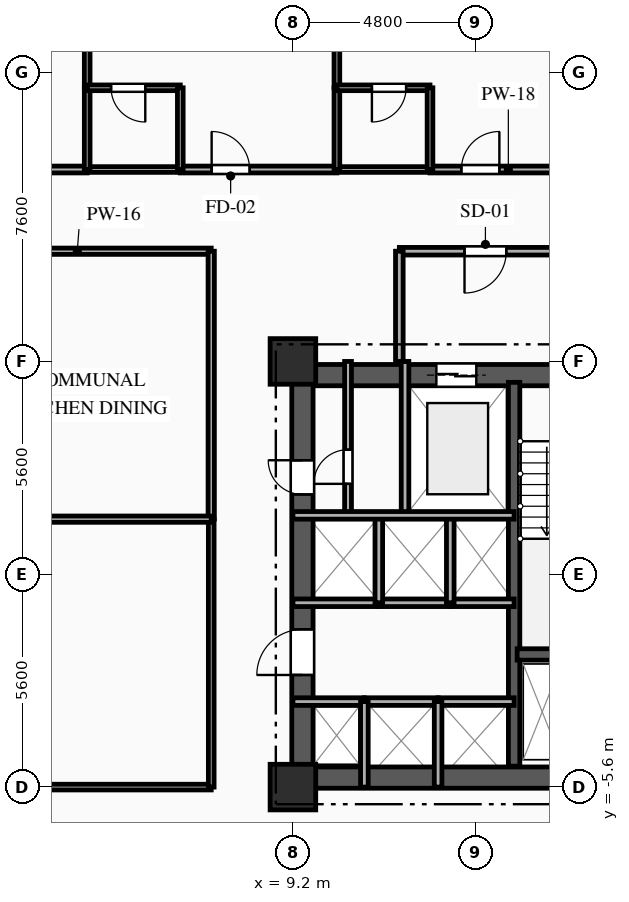
"""IFC4 building model, lengths in metres.
Left out: names, types, materials, properties, quantities, classifications, styles, units other than length and angle.
Written with IfcOpenShell. Run it as: python <this file> out.ifc"""

import sys

from ifc_helpers import new_model, si_unit, direction, frame, frame_2d, origin, origin_2d, place, context, subcontext, project, spatial, rectangle, extrude, element, fill, save


model = new_model("IFC4")
c1 = context("Model", 3, precision=1e-05, world=origin(), true_north=direction((0.0, 1.0)))
c2 = subcontext(c1, "Body", "Model", "MODEL_VIEW")
j1 = project(units=[si_unit("LENGTHUNIT", "METRE"), si_unit("PLANEANGLEUNIT", "RADIAN")], contexts=[c1])
p1 = place(None, origin())
s1 = spatial("IfcSite", under=j1, at=p1, CompositionType="ELEMENT")
p2 = place(p1, origin())
s2 = spatial("IfcBuilding", under=s1, at=p2, CompositionType="ELEMENT")
p3 = place(p2, frame((0.0, 0.0, 33.7)))
s3 = spatial("IfcBuildingStorey", under=s2, at=p3, CompositionType="ELEMENT", Elevation=33.7)
for number, where, z_axis, x_axis in (
    (1, (9.2, -5.6, 0.0), (0.0, 0.0, 1.0), (1.0, 0.0, 0.0)),
    (2, (9.2, 5.6, 0.0), (0.0, 0.0, 1.0), (1.0, 0.0, 0.0)),
):
    element("IfcColumn", number, at=place(p3, frame(where, z_axis=z_axis, x_axis=x_axis)), inside=s3, PredefinedType="COLUMN", context=c2, shape_type="SweptSolid", body=[
        extrude(rectangle(XDim=1.2, YDim=1.2, at=origin_2d()), origin(), (0.0, 0.0, 1.0), 3.35),
    ])
p4 = place(p3, frame((9.2, 5.24, 0.0), z_axis=(0.0, 0.0, 1.0), x_axis=(1.0, 0.0, 0.0)))
e3 = element("IfcWall", 3, at=p4, inside=s3, PredefinedType="SHEAR", context=c2, shape_type="SweptSolid", body=[
    extrude(rectangle(XDim=9.6, YDim=0.56, at=frame_2d((4.8, 0.0))), origin(), (0.0, 0.0, 1.0), 3.035),
])
p5 = place(p4, frame((6.95, 0.0, 0.0)))
e4 = element("IfcOpeningElement", 4, at=p5, cuts=e3, PredefinedType="OPENING", context=c2, shape_type="SweptSolid", body=[
    extrude(rectangle(XDim=1.1, YDim=2.15, at=frame_2d((0.55, 1.075))), frame((0.0, 0.29, 0.0), z_axis=(0.0, -1.0, 0.0), x_axis=(1.0, 0.0, 0.0)), (0.0, 0.0, 1.0), 0.58),
])
p6 = place(p4, frame((3.775, 0.0, 0.0)))
e5 = element("IfcOpeningElement", 5, at=p6, cuts=e3, PredefinedType="OPENING", context=c2, shape_type="SweptSolid", body=[
    extrude(rectangle(XDim=1.05, YDim=2.1, at=frame_2d((0.525, 1.05))), frame((0.0, 0.29, 0.0), z_axis=(0.0, -1.0, 0.0), x_axis=(1.0, 0.0, 0.0)), (0.0, 0.0, 1.0), 0.58),
])
p7 = place(p3, frame((9.2, -5.35, 0.0), z_axis=(0.0, 0.0, 1.0), x_axis=(1.0, 0.0, 0.0)))
e6 = element("IfcWall", 6, at=p7, inside=s3, PredefinedType="SHEAR", context=c2, shape_type="SweptSolid", body=[
    extrude(rectangle(XDim=9.6, YDim=0.56, at=frame_2d((4.8, 0.0))), origin(), (0.0, 0.0, 1.0), 3.035),
])
p8 = place(p7, frame((7.65, 0.0, 0.0)))
e7 = element("IfcOpeningElement", 7, at=p8, cuts=e6, PredefinedType="OPENING", context=c2, shape_type="SweptSolid", body=[
    extrude(rectangle(XDim=0.9, YDim=2.1, at=frame_2d((0.45, 1.05))), frame((0.0, 0.29, 0.0), z_axis=(0.0, -1.0, 0.0), x_axis=(1.0, 0.0, 0.0)), (0.0, 0.0, 1.0), 0.58),
])
p9 = place(p3, frame((9.45, -5.05, 0.0), z_axis=(0.0, 0.0, 1.0), x_axis=(0.0, 1.0, 0.0)))
e8 = element("IfcWall", 8, at=p9, inside=s3, PredefinedType="SHEAR", context=c2, shape_type="SweptSolid", body=[
    extrude(rectangle(XDim=10.1, YDim=0.56, at=frame_2d((5.05, 0.0))), origin(), (0.0, 0.0, 1.0), 3.035),
])
p10 = place(p9, frame((7.15, 0.0, 0.0)))
e9 = element("IfcOpeningElement", 9, at=p10, cuts=e8, PredefinedType="OPENING", context=c2, shape_type="SweptSolid", body=[
    extrude(rectangle(XDim=0.9, YDim=2.1, at=frame_2d((0.45, 1.05))), frame((0.0, 0.29, 0.0), z_axis=(0.0, -1.0, 0.0), x_axis=(1.0, 0.0, 0.0)), (0.0, 0.0, 1.0), 0.58),
])
p11 = place(p9, frame((2.4, 0.0, 0.0)))
e10 = element("IfcOpeningElement", 10, at=p11, cuts=e8, PredefinedType="OPENING", context=c2, shape_type="SweptSolid", body=[
    extrude(rectangle(XDim=1.2, YDim=2.15, at=frame_2d((0.6, 1.075))), frame((0.0, 0.29, 0.0), z_axis=(0.0, -1.0, 0.0), x_axis=(1.0, 0.0, 0.0)), (0.0, 0.0, 1.0), 0.58),
])
p12 = place(p3, frame((15.02, -5.05, 0.0), z_axis=(0.0, 0.0, 1.0), x_axis=(0.0, 1.0, 0.0)))
e11 = element("IfcWall", 11, at=p12, inside=s3, PredefinedType="SHEAR", context=c2, shape_type="SweptSolid", body=[
    extrude(rectangle(XDim=10.1, YDim=0.3, at=frame_2d((5.05, 0.0))), origin(), (0.0, 0.0, 1.0), 3.035),
])
p13 = place(p3, frame((15.1, -2.11, 0.0), z_axis=(0.0, 0.0, 1.0), x_axis=(1.0, 0.0, 0.0)))
e12 = element("IfcWall", 12, at=p13, inside=s3, PredefinedType="SHEAR", context=c2, shape_type="SweptSolid", body=[
    extrude(rectangle(XDim=3.18, YDim=0.3, at=frame_2d((1.59, 0.0))), origin(), (0.0, 0.0, 1.0), 3.035),
])
p14 = place(p3, frame((12.15, 5.6, 0.0), z_axis=(0.0, 0.0, 1.0), x_axis=(0.0, -1.0, 0.0)))
e13 = element("IfcWall", 13, at=p14, inside=s3, PredefinedType="PARTITIONING", context=c2, shape_type="SweptSolid", body=[
    extrude(rectangle(XDim=4.05, YDim=0.2, at=frame_2d((2.025, 0.0))), origin(), (0.0, 0.0, 1.0), 3.035),
])
p15 = place(p3, frame((18.8, 8.5, 0.0), z_axis=(0.0, 0.0, 1.0), x_axis=(-1.0, 0.0, 0.0)))
e14 = element("IfcWall", 14, at=p15, inside=s3, PredefinedType="PARTITIONING", context=c2, shape_type="SweptSolid", body=[
    extrude(rectangle(XDim=6.8, YDim=0.2, at=frame_2d((3.4, 0.0))), origin(), (0.0, 0.0, 1.0), 3.035),
])
p16 = place(p15, frame((3.985, 0.0, 0.0)))
e15 = element("IfcOpeningElement", 15, at=p16, cuts=e14, PredefinedType="OPENING", context=c2, shape_type="SweptSolid", body=[
    extrude(rectangle(XDim=1.1, YDim=2.15, at=frame_2d((0.55, 1.075))), frame((0.0, 0.11, 0.0), z_axis=(0.0, -1.0, 0.0), x_axis=(1.0, 0.0, 0.0)), (0.0, 0.0, 1.0), 0.22),
])
p17 = place(p3, frame((12.0, 8.5, 0.0), z_axis=(0.0, 0.0, 1.0), x_axis=(0.0, -1.0, 0.0)))
e16 = element("IfcWall", 16, at=p17, inside=s3, PredefinedType="PARTITIONING", context=c2, shape_type="SweptSolid", body=[
    extrude(rectangle(XDim=2.9, YDim=0.2, at=frame_2d((1.45, 0.0))), origin(), (0.0, 0.0, 1.0), 3.035),
])
p18 = place(p3, frame((10.65, 1.55, 0.0), z_axis=(0.0, 0.0, 1.0), x_axis=(0.0, 1.0, 0.0)))
e17 = element("IfcWall", 17, at=p18, inside=s3, PredefinedType="PARTITIONING", context=c2, shape_type="SweptSolid", body=[
    extrude(rectangle(XDim=4.05, YDim=0.18, at=frame_2d((2.025, 0.0))), origin(), (0.0, 0.0, 1.0), 3.035),
])
p19 = place(p18, frame((0.829, 0.0, 0.0)))
e18 = element("IfcOpeningElement", 18, at=p19, cuts=e17, PredefinedType="OPENING", context=c2, shape_type="SweptSolid", body=[
    extrude(rectangle(XDim=0.9, YDim=2.1, at=frame_2d((0.45, 1.05))), frame((0.0, 0.1, 0.0), z_axis=(0.0, -1.0, 0.0), x_axis=(1.0, 0.0, 0.0)), (0.0, 0.0, 1.0), 0.2),
])
p20 = place(p3, frame((9.2, -3.35, 0.0), z_axis=(0.0, 0.0, 1.0), x_axis=(1.0, 0.0, 0.0)))
e19 = element("IfcWall", 19, at=p20, inside=s3, PredefinedType="PARTITIONING", context=c2, shape_type="SweptSolid", body=[
    extrude(rectangle(XDim=1.88, YDim=0.2, at=frame_2d((0.94, 0.0))), origin(), (0.0, 0.0, 1.0), 2.75),
])
p21 = place(p3, frame((11.08, -3.35, 0.0), z_axis=(0.0, 0.0, 1.0), x_axis=(1.0, 0.0, 0.0)))
e20 = element("IfcWall", 20, at=p21, inside=s3, PredefinedType="PARTITIONING", context=c2, shape_type="SweptSolid", body=[
    extrude(rectangle(XDim=1.94, YDim=0.2, at=frame_2d((0.97, 0.0))), origin(), (0.0, 0.0, 1.0), 3.035),
])
p22 = place(p3, frame((13.02, -3.35, 0.0), z_axis=(0.0, 0.0, 1.0), x_axis=(1.0, 0.0, 0.0)))
e21 = element("IfcWall", 21, at=p22, inside=s3, PredefinedType="PARTITIONING", context=c2, shape_type="SweptSolid", body=[
    extrude(rectangle(XDim=2.0, YDim=0.2, at=frame_2d((1.0, 0.0))), origin(), (0.0, 0.0, 1.0), 3.035),
])
p23 = place(p3, frame((11.46, -0.75, 0.0), z_axis=(0.0, 0.0, 1.0), x_axis=(-1.0, 0.0, 0.0)))
e22 = element("IfcWall", 22, at=p23, inside=s3, PredefinedType="PARTITIONING", context=c2, shape_type="SweptSolid", body=[
    extrude(rectangle(XDim=2.26, YDim=0.2, at=frame_2d((1.13, 0.0))), origin(), (0.0, 0.0, 1.0), 3.035),
])
p24 = place(p3, frame((13.34, -0.75, 0.0), z_axis=(0.0, 0.0, 1.0), x_axis=(-1.0, 0.0, 0.0)))
e23 = element("IfcWall", 23, at=p24, inside=s3, PredefinedType="PARTITIONING", context=c2, shape_type="SweptSolid", body=[
    extrude(rectangle(XDim=1.88, YDim=0.2, at=frame_2d((0.94, 0.0))), origin(), (0.0, 0.0, 1.0), 3.035),
])
p25 = place(p3, frame((15.02, -0.75, 0.0), z_axis=(0.0, 0.0, 1.0), x_axis=(-1.0, 0.0, 0.0)))
e24 = element("IfcWall", 24, at=p25, inside=s3, PredefinedType="PARTITIONING", context=c2, shape_type="SweptSolid", body=[
    extrude(rectangle(XDim=1.68, YDim=0.2, at=frame_2d((0.84, 0.0))), origin(), (0.0, 0.0, 1.0), 3.035),
])
for number, where, z_axis, x_axis in (
    (25, (11.08, -5.6, 0.0), (0.0, 0.0, 1.0), (0.0, 1.0, 0.0)),
    (26, (13.02, -5.6, 0.0), (0.0, 0.0, 1.0), (0.0, 1.0, 0.0)),
):
    element("IfcWall", number, at=place(p3, frame(where, z_axis=z_axis, x_axis=x_axis)), inside=s3, PredefinedType="PARTITIONING", context=c2, shape_type="SweptSolid", body=[
        extrude(rectangle(XDim=2.25, YDim=0.2, at=frame_2d((1.125, 0.0))), origin(), (0.0, 0.0, 1.0), 3.035),
    ])
for number, where, z_axis, x_axis in (
    (27, (11.46, -0.75, 0.0), (0.0, 0.0, 1.0), (0.0, 1.0, 0.0)),
    (28, (13.34, -0.75, 0.0), (0.0, 0.0, 1.0), (0.0, 1.0, 0.0)),
):
    element("IfcWall", number, at=place(p3, frame(where, z_axis=z_axis, x_axis=x_axis)), inside=s3, PredefinedType="PARTITIONING", context=c2, shape_type="SweptSolid", body=[
        extrude(rectangle(XDim=2.3, YDim=0.2, at=frame_2d((1.15, 0.0))), origin(), (0.0, 0.0, 1.0), 3.035),
    ])
p26 = place(p3, frame((0.0, 10.65, 0.0), z_axis=(0.0, 0.0, 1.0), x_axis=(1.0, 0.0, 0.0)))
e29 = element("IfcWall", 29, at=p26, inside=s3, PredefinedType="PARTITIONING", context=c2, shape_type="SweptSolid", body=[
    extrude(rectangle(XDim=3.786, YDim=0.18, at=frame_2d((1.893, 0.0))), origin(), (0.0, 0.0, 1.0), 3.035),
])
p27 = place(p26, frame((1.393, 0.0, 0.0)))
e30 = element("IfcOpeningElement", 30, at=p27, cuts=e29, PredefinedType="OPENING", context=c2, shape_type="SweptSolid", body=[
    extrude(rectangle(XDim=1.0, YDim=2.15, at=frame_2d((0.5, 1.075))), frame((0.0, 0.1, 0.0), z_axis=(0.0, -1.0, 0.0), x_axis=(1.0, 0.0, 0.0)), (0.0, 0.0, 1.0), 0.2),
])
p28 = place(p3, frame((6.236, 10.65, 0.0), z_axis=(0.0, 0.0, 1.0), x_axis=(1.0, 0.0, 0.0)))
e31 = element("IfcWall", 31, at=p28, inside=s3, PredefinedType="PARTITIONING", context=c2, shape_type="SweptSolid", body=[
    extrude(rectangle(XDim=4.121, YDim=0.18, at=frame_2d((2.061, 0.0))), origin(), (0.0, 0.0, 1.0), 3.035),
])
p29 = place(p28, frame((0.825, 0.0, 0.0)))
e32 = element("IfcOpeningElement", 32, at=p29, cuts=e31, PredefinedType="OPENING", context=c2, shape_type="SweptSolid", body=[
    extrude(rectangle(XDim=1.0, YDim=2.15, at=frame_2d((0.5, 1.075))), frame((0.0, 0.1, 0.0), z_axis=(0.0, -1.0, 0.0), x_axis=(1.0, 0.0, 0.0)), (0.0, 0.0, 1.0), 0.2),
])
p30 = place(p3, frame((3.786, 10.65, 0.0), z_axis=(0.0, 0.0, 1.0), x_axis=(1.0, 0.0, 0.0)))
e33 = element("IfcWall", 33, at=p30, inside=s3, PredefinedType="PLUMBINGWALL", context=c2, shape_type="SweptSolid", body=[
    extrude(rectangle(XDim=2.45, YDim=0.15, at=frame_2d((1.225, 0.0))), origin(), (0.0, 0.0, 1.0), 3.035),
])
p31 = place(p3, frame((12.807, 10.65, 0.0), z_axis=(0.0, 0.0, 1.0), x_axis=(1.0, 0.0, 0.0)))
e34 = element("IfcWall", 34, at=p31, inside=s3, PredefinedType="PARTITIONING", context=c2, shape_type="SweptSolid", body=[
    extrude(rectangle(XDim=4.122, YDim=0.18, at=frame_2d((2.061, 0.0))), origin(), (0.0, 0.0, 1.0), 3.035),
])
p32 = place(p31, frame((0.825, 0.0, 0.0)))
e35 = element("IfcOpeningElement", 35, at=p32, cuts=e34, PredefinedType="OPENING", context=c2, shape_type="SweptSolid", body=[
    extrude(rectangle(XDim=1.0, YDim=2.15, at=frame_2d((0.5, 1.075))), frame((0.0, 0.1, 0.0), z_axis=(0.0, -1.0, 0.0), x_axis=(1.0, 0.0, 0.0)), (0.0, 0.0, 1.0), 0.2),
])
p33 = place(p3, frame((10.357, 10.65, 0.0), z_axis=(0.0, 0.0, 1.0), x_axis=(1.0, 0.0, 0.0)))
e36 = element("IfcWall", 36, at=p33, inside=s3, PredefinedType="PLUMBINGWALL", context=c2, shape_type="SweptSolid", body=[
    extrude(rectangle(XDim=2.45, YDim=0.15, at=frame_2d((1.225, 0.0))), origin(), (0.0, 0.0, 1.0), 3.035),
])
p34 = place(p3, frame((7.05, 8.5, 0.0), z_axis=(0.0, 0.0, 1.0), x_axis=(-1.0, 0.0, 0.0)))
e37 = element("IfcWall", 37, at=p34, inside=s3, PredefinedType="PARTITIONING", context=c2, shape_type="SweptSolid", body=[
    extrude(rectangle(XDim=7.05, YDim=0.165, at=frame_2d((3.525, 0.0))), origin(), (0.0, 0.0, 1.0), 3.035),
])
p35 = place(p34, frame((4.728, 0.0, 0.0)))
e38 = element("IfcOpeningElement", 38, at=p35, cuts=e37, PredefinedType="OPENING", context=c2, shape_type="SweptSolid", body=[
    extrude(rectangle(XDim=1.15, YDim=2.15, at=frame_2d((0.575, 1.075))), frame((0.0, 0.093, 0.0), z_axis=(0.0, -1.0, 0.0), x_axis=(1.0, 0.0, 0.0)), (0.0, 0.0, 1.0), 0.185),
])
p36 = place(p3, frame((0.0, -5.6, 0.0), z_axis=(0.0, 0.0, 1.0), x_axis=(1.0, 0.0, 0.0)))
e39 = element("IfcWall", 39, at=p36, inside=s3, PredefinedType="PARTITIONING", context=c2, shape_type="SweptSolid", body=[
    extrude(rectangle(XDim=7.05, YDim=0.15, at=frame_2d((3.525, 0.0))), origin(), (0.0, 0.0, 1.0), 2.52),
])
p37 = place(p36, frame((1.185, 0.0, 0.0)))
e40 = element("IfcOpeningElement", 40, at=p37, cuts=e39, PredefinedType="OPENING", context=c2, shape_type="SweptSolid", body=[
    extrude(rectangle(XDim=1.05, YDim=2.15, at=frame_2d((0.525, 1.075))), frame((0.0, 0.085, 0.0), z_axis=(0.0, -1.0, 0.0), x_axis=(1.0, 0.0, 0.0)), (0.0, 0.0, 1.0), 0.17),
])
p38 = place(p3, frame((7.05, -5.6, 0.0), z_axis=(0.0, 0.0, 1.0), x_axis=(0.0, 1.0, 0.0)))
e41 = element("IfcWall", 41, at=p38, inside=s3, PredefinedType="PARTITIONING", context=c2, shape_type="SweptSolid", body=[
    extrude(rectangle(XDim=7.05, YDim=0.15, at=frame_2d((3.525, 0.0))), origin(), (0.0, 0.0, 1.0), 3.035),
])
p39 = place(p3, frame((7.05, 1.45, 0.0), z_axis=(0.0, 0.0, 1.0), x_axis=(0.0, 1.0, 0.0)))
e42 = element("IfcWall", 42, at=p39, inside=s3, PredefinedType="PARTITIONING", context=c2, shape_type="SweptSolid", body=[
    extrude(rectangle(XDim=7.05, YDim=0.165, at=frame_2d((3.525, 0.0))), origin(), (0.0, 0.0, 1.0), 3.035),
])
p40 = place(p3, frame((3.786, 19.4, 0.0), z_axis=(0.0, 0.0, 1.0), x_axis=(0.0, -1.0, 0.0)))
e43 = element("IfcWall", 43, at=p40, inside=s3, PredefinedType="PARTITIONING", context=c2, shape_type="SweptSolid", body=[
    extrude(rectangle(XDim=6.6, YDim=0.15, at=frame_2d((3.3, 0.0))), origin(), (0.0, 0.0, 1.0), 3.035),
])
p41 = place(p3, frame((3.786, 12.8, 0.0), z_axis=(0.0, 0.0, 1.0), x_axis=(0.0, -1.0, 0.0)))
e44 = element("IfcWall", 44, at=p41, inside=s3, PredefinedType="PLUMBINGWALL", context=c2, shape_type="SweptSolid", body=[
    extrude(rectangle(XDim=2.15, YDim=0.15, at=frame_2d((1.075, 0.0))), origin(), (0.0, 0.0, 1.0), 3.035),
])
p42 = place(p3, frame((6.236, 12.8, 0.0), z_axis=(0.0, 0.0, 1.0), x_axis=(-1.0, 0.0, 0.0)))
e45 = element("IfcWall", 45, at=p42, inside=s3, PredefinedType="PLUMBINGWALL", context=c2, shape_type="SweptSolid", body=[
    extrude(rectangle(XDim=2.45, YDim=0.15, at=frame_2d((1.225, 0.0))), origin(), (0.0, 0.0, 1.0), 3.035),
])
p43 = place(p42, frame((0.921, 0.0, 0.0)))
e46 = element("IfcOpeningElement", 46, at=p43, cuts=e45, PredefinedType="OPENING", context=c2, shape_type="SweptSolid", body=[
    extrude(rectangle(XDim=0.9, YDim=2.1, at=frame_2d((0.45, 1.05))), frame((0.0, 0.085, 0.0), z_axis=(0.0, -1.0, 0.0), x_axis=(1.0, 0.0, 0.0)), (0.0, 0.0, 1.0), 0.17),
])
p44 = place(p3, frame((6.236, 10.65, 0.0), z_axis=(0.0, 0.0, 1.0), x_axis=(0.0, 1.0, 0.0)))
e47 = element("IfcWall", 47, at=p44, inside=s3, PredefinedType="PLUMBINGWALL", context=c2, shape_type="SweptSolid", body=[
    extrude(rectangle(XDim=2.15, YDim=0.15, at=frame_2d((1.075, 0.0))), origin(), (0.0, 0.0, 1.0), 3.035),
])
p45 = place(p3, frame((10.357, 19.4, 0.0), z_axis=(0.0, 0.0, 1.0), x_axis=(0.0, -1.0, 0.0)))
e48 = element("IfcWall", 48, at=p45, inside=s3, PredefinedType="PARTITIONING", context=c2, shape_type="SweptSolid", body=[
    extrude(rectangle(XDim=6.6, YDim=0.15, at=frame_2d((3.3, 0.0))), origin(), (0.0, 0.0, 1.0), 3.035),
])
p46 = place(p3, frame((10.357, 12.8, 0.0), z_axis=(0.0, 0.0, 1.0), x_axis=(0.0, -1.0, 0.0)))
e49 = element("IfcWall", 49, at=p46, inside=s3, PredefinedType="PLUMBINGWALL", context=c2, shape_type="SweptSolid", body=[
    extrude(rectangle(XDim=2.15, YDim=0.15, at=frame_2d((1.075, 0.0))), origin(), (0.0, 0.0, 1.0), 3.035),
])
p47 = place(p3, frame((12.807, 12.8, 0.0), z_axis=(0.0, 0.0, 1.0), x_axis=(-1.0, 0.0, 0.0)))
e50 = element("IfcWall", 50, at=p47, inside=s3, PredefinedType="PLUMBINGWALL", context=c2, shape_type="SweptSolid", body=[
    extrude(rectangle(XDim=2.45, YDim=0.15, at=frame_2d((1.225, 0.0))), origin(), (0.0, 0.0, 1.0), 3.035),
])
p48 = place(p47, frame((0.629, 0.0, 0.0)))
e51 = element("IfcOpeningElement", 51, at=p48, cuts=e50, PredefinedType="OPENING", context=c2, shape_type="SweptSolid", body=[
    extrude(rectangle(XDim=0.9, YDim=2.1, at=frame_2d((0.45, 1.05))), frame((0.0, 0.085, 0.0), z_axis=(0.0, -1.0, 0.0), x_axis=(1.0, 0.0, 0.0)), (0.0, 0.0, 1.0), 0.17),
])
p49 = place(p3, frame((12.807, 10.65, 0.0), z_axis=(0.0, 0.0, 1.0), x_axis=(0.0, 1.0, 0.0)))
e52 = element("IfcWall", 52, at=p49, inside=s3, PredefinedType="PLUMBINGWALL", context=c2, shape_type="SweptSolid", body=[
    extrude(rectangle(XDim=2.15, YDim=0.15, at=frame_2d((1.075, 0.0))), origin(), (0.0, 0.0, 1.0), 3.035),
])
p50 = place(p3, frame((0.0, 1.45, 0.0), z_axis=(0.0, 0.0, 1.0), x_axis=(1.0, 0.0, 0.0)))
e53 = element("IfcWall", 53, at=p50, inside=s3, PredefinedType="PARTITIONING", context=c2, shape_type="SweptSolid", body=[
    extrude(rectangle(XDim=7.05, YDim=0.165, at=frame_2d((3.525, 0.0))), origin(), (0.0, 0.0, 1.0), 3.035),
])
p51 = place(p3, frame((9.2, 1.55, 0.0), z_axis=(0.0, 0.0, 1.0), x_axis=(1.0, 0.0, 0.0)))
e54 = element("IfcWall", 54, at=p51, inside=s3, PredefinedType="PARTITIONING", context=c2, shape_type="SweptSolid", body=[
    extrude(rectangle(XDim=5.82, YDim=0.2, at=frame_2d((2.91, 0.0))), origin(), (0.0, 0.0, 1.0), 3.035),
])
p52 = place(p6, origin())
e55 = element("IfcDoor", 55, at=p52, inside=s3, OperationType="DOUBLE_DOOR_SLIDING", PredefinedType="DOOR", context=c2, shape_type="SweptSolid", body=[
    extrude(rectangle(XDim=1.05, YDim=2.1, at=frame_2d((0.525, 1.05))), frame((0.0, 0.025, 0.0), z_axis=(0.0, -1.0, 0.0), x_axis=(1.0, 0.0, 0.0)), (0.0, 0.0, 1.0), 0.05),
])
fill(e5, e55)
p53 = place(p16, origin())
e56 = element("IfcDoor", 56, at=p53, inside=s3, OperationType="SINGLE_SWING_RIGHT", PredefinedType="DOOR", context=c2, shape_type="SweptSolid", body=[
    extrude(rectangle(XDim=1.1, YDim=2.15, at=frame_2d((0.55, 1.075))), frame((0.0, 0.025, 0.0), z_axis=(0.0, -1.0, 0.0), x_axis=(1.0, 0.0, 0.0)), (0.0, 0.0, 1.0), 0.05),
])
fill(e15, e56)
p54 = place(p19, origin())
e57 = element("IfcDoor", 57, at=p54, inside=s3, OperationType="SINGLE_SWING_LEFT", PredefinedType="DOOR", context=c2, shape_type="SweptSolid", body=[
    extrude(rectangle(XDim=0.9, YDim=2.1, at=frame_2d((0.45, 1.05))), frame((0.0, 0.025, 0.0), z_axis=(0.0, -1.0, 0.0), x_axis=(1.0, 0.0, 0.0)), (0.0, 0.0, 1.0), 0.05),
])
fill(e18, e57)
p55 = place(p10, origin())
e58 = element("IfcDoor", 58, at=p55, inside=s3, OperationType="SINGLE_SWING_RIGHT", PredefinedType="DOOR", context=c2, shape_type="SweptSolid", body=[
    extrude(rectangle(XDim=0.9, YDim=2.1, at=frame_2d((0.45, 1.05))), frame((0.0, 0.025, 0.0), z_axis=(0.0, -1.0, 0.0), x_axis=(1.0, 0.0, 0.0)), (0.0, 0.0, 1.0), 0.05),
])
fill(e9, e58)
p56 = place(p11, origin())
e59 = element("IfcDoor", 59, at=p56, inside=s3, OperationType="SINGLE_SWING_LEFT", PredefinedType="DOOR", context=c2, shape_type="SweptSolid", body=[
    extrude(rectangle(XDim=1.2, YDim=2.15, at=frame_2d((0.6, 1.075))), frame((0.0, 0.025, 0.0), z_axis=(0.0, -1.0, 0.0), x_axis=(1.0, 0.0, 0.0)), (0.0, 0.0, 1.0), 0.05),
])
fill(e10, e59)
p57 = place(p29, origin())
e60 = element("IfcDoor", 60, at=p57, inside=s3, OperationType="SINGLE_SWING_LEFT", PredefinedType="DOOR", context=c2, shape_type="SweptSolid", body=[
    extrude(rectangle(XDim=1.0, YDim=2.15, at=frame_2d((0.5, 1.075))), frame((0.0, 0.025, 0.0), z_axis=(0.0, -1.0, 0.0), x_axis=(1.0, 0.0, 0.0)), (0.0, 0.0, 1.0), 0.05),
])
fill(e32, e60)
p58 = place(p32, origin())
e61 = element("IfcDoor", 61, at=p58, inside=s3, OperationType="SINGLE_SWING_RIGHT", PredefinedType="DOOR", context=c2, shape_type="SweptSolid", body=[
    extrude(rectangle(XDim=1.0, YDim=2.15, at=frame_2d((0.5, 1.075))), frame((0.0, 0.025, 0.0), z_axis=(0.0, -1.0, 0.0), x_axis=(1.0, 0.0, 0.0)), (0.0, 0.0, 1.0), 0.05),
])
fill(e35, e61)
p59 = place(p43, origin())
e62 = element("IfcDoor", 62, at=p59, inside=s3, OperationType="SINGLE_SWING_LEFT", PredefinedType="DOOR", context=c2, shape_type="SweptSolid", body=[
    extrude(rectangle(XDim=0.9, YDim=2.1, at=frame_2d((0.45, 1.05))), frame((0.0, 0.025, 0.0), z_axis=(0.0, -1.0, 0.0), x_axis=(1.0, 0.0, 0.0)), (0.0, 0.0, 1.0), 0.05),
])
fill(e46, e62)
p60 = place(p48, origin())
e63 = element("IfcDoor", 63, at=p60, inside=s3, OperationType="SINGLE_SWING_RIGHT", PredefinedType="DOOR", context=c2, shape_type="SweptSolid", body=[
    extrude(rectangle(XDim=0.9, YDim=2.1, at=frame_2d((0.45, 1.05))), frame((0.0, 0.025, 0.0), z_axis=(0.0, -1.0, 0.0), x_axis=(1.0, 0.0, 0.0)), (0.0, 0.0, 1.0), 0.05),
])
fill(e51, e63)
save(model, sys.argv[1])
